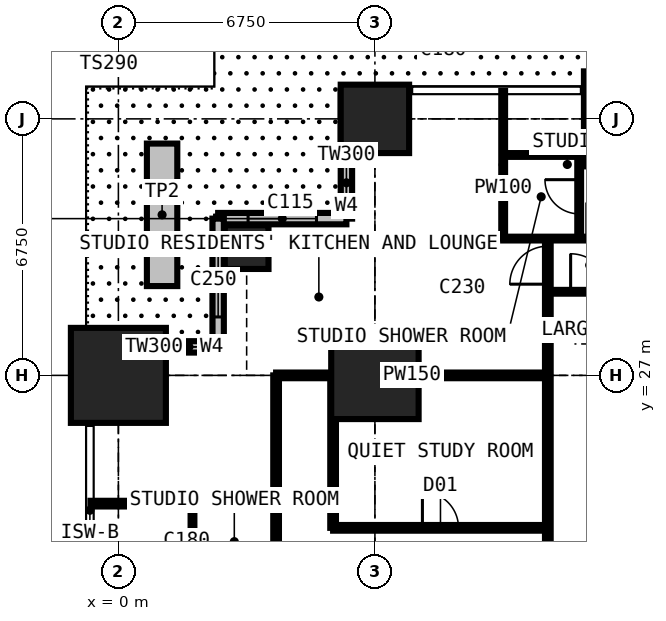
"""IFC4 building model, lengths in metres.
Left out: names, types, materials, properties, quantities, classifications, styles, units other than length and angle.
Written with IfcOpenShell. Run it as: python <this file> out.ifc"""

import sys

from ifc_helpers import new_model, si_unit, direction, frame, frame_2d, origin, origin_2d, place, context, subcontext, project, spatial, rectangle, extrude, element, fill, save


model = new_model("IFC4")
c1 = context("Model", 3, precision=1e-05, world=origin(), true_north=direction((0.0, 1.0)))
c2 = subcontext(c1, "Body", "Model", "MODEL_VIEW")
j1 = project(units=[si_unit("LENGTHUNIT", "METRE"), si_unit("PLANEANGLEUNIT", "RADIAN")], contexts=[c1])
p1 = place(None, origin())
s1 = spatial("IfcSite", under=j1, at=p1, CompositionType="ELEMENT")
p2 = place(p1, origin())
s2 = spatial("IfcBuilding", under=s1, at=p2, CompositionType="ELEMENT")
p3 = place(p2, frame((0.0, 0.0, 80.1)))
s3 = spatial("IfcBuildingStorey", under=s2, at=p3, CompositionType="ELEMENT", Elevation=80.1)
p4 = place(p3, frame((0.0, 27.0, 0.0), z_axis=(0.0, 0.0, 1.0), x_axis=(1.0, 0.0, 0.0)))
e1 = element("IfcColumn", 1, at=p4, inside=s3, PredefinedType="COLUMN", context=c2, shape_type="SweptSolid", body=[
    extrude(rectangle(XDim=2.5, YDim=2.5, at=origin_2d()), origin(), (0.0, 0.0, 1.0), 3.6),
])
p5 = place(p3, frame((3.375, 30.375, 0.0), z_axis=(0.0, 0.0, 1.0), x_axis=(1.0, 0.0, 0.0)))
e2 = element("IfcColumn", 2, at=p5, inside=s3, PredefinedType="COLUMN", context=c2, shape_type="SweptSolid", body=[
    extrude(rectangle(XDim=1.15, YDim=1.15, at=origin_2d()), origin(), (0.0, 0.0, 1.0), 3.6),
])
p6 = place(p3, frame((6.75, 27.0, 0.0), z_axis=(0.0, 0.0, 1.0), x_axis=(1.0, 0.0, 0.0)))
e3 = element("IfcColumn", 3, at=p6, inside=s3, PredefinedType="COLUMN", context=c2, shape_type="SweptSolid", body=[
    extrude(rectangle(XDim=2.3, YDim=2.3, at=origin_2d()), origin(), (0.0, 0.0, 1.0), 3.6),
])
p7 = place(p3, frame((6.75, 33.75, 0.0), z_axis=(0.0, 0.0, 1.0), x_axis=(1.0, 0.0, 0.0)))
e4 = element("IfcColumn", 4, at=p7, inside=s3, PredefinedType="COLUMN", context=c2, shape_type="SweptSolid", body=[
    extrude(rectangle(XDim=1.8, YDim=1.8, at=origin_2d()), origin(), (0.0, 0.0, 1.0), 3.6),
])
p8 = place(p3, frame((13.5, 33.75, 0.0), z_axis=(0.0, 0.0, 1.0), x_axis=(1.0, 0.0, 0.0)))
e5 = element("IfcColumn", 5, at=p8, inside=s3, PredefinedType="COLUMN", context=c2, shape_type="SweptSolid", body=[
    extrude(rectangle(XDim=2.5, YDim=2.5, at=origin_2d()), origin(), (0.0, 0.0, 1.0), 3.6),
])
p9 = place(p3, frame((6.0, 34.5, 0.0), z_axis=(0.0, 0.0, 1.0), x_axis=(0.0, -1.0, 0.0)))
e6 = element("IfcWall", 6, at=p9, inside=s3, PredefinedType="SOLIDWALL", context=c2, shape_type="SweptSolid", body=[
    extrude(rectangle(XDim=3.375, YDim=0.3, at=frame_2d((1.688, 0.0))), origin(), (0.0, 0.0, 1.0), 3.375),
])
p10 = place(p9, frame((1.833, 0.0, 0.9)))
e7 = element("IfcOpeningElement", 7, at=p10, cuts=e6, PredefinedType="OPENING", context=c2, shape_type="SweptSolid", body=[
    extrude(rectangle(XDim=1.2, YDim=1.8, at=frame_2d((0.6, 0.9))), frame((0.0, 0.16, 0.0), z_axis=(0.0, -1.0, 0.0), x_axis=(1.0, 0.0, 0.0)), (0.0, 0.0, 1.0), 0.32),
])
p11 = place(p3, frame((6.0, 31.125, 0.0), z_axis=(0.0, 0.0, 1.0), x_axis=(-1.0, 0.0, 0.0)))
e8 = element("IfcWall", 8, at=p11, inside=s3, PredefinedType="SOLIDWALL", context=c2, shape_type="SweptSolid", body=[
    extrude(rectangle(XDim=3.375, YDim=0.3, at=frame_2d((1.688, 0.0))), origin(), (0.0, 0.0, 1.0), 3.375),
])
p12 = place(p11, frame((0.788, 0.0, 0.6)))
e9 = element("IfcOpeningElement", 9, at=p12, cuts=e8, PredefinedType="OPENING", context=c2, shape_type="SweptSolid", body=[
    extrude(rectangle(XDim=1.8, YDim=2.1, at=frame_2d((0.9, 1.05))), frame((0.0, 0.16, 0.0), z_axis=(0.0, -1.0, 0.0), x_axis=(1.0, 0.0, 0.0)), (0.0, 0.0, 1.0), 0.32),
])
p13 = place(p3, frame((2.625, 31.125, 0.0), z_axis=(0.0, 0.0, 1.0), x_axis=(0.0, -1.0, 0.0)))
e10 = element("IfcWall", 10, at=p13, inside=s3, PredefinedType="SOLIDWALL", context=c2, shape_type="SweptSolid", body=[
    extrude(rectangle(XDim=3.375, YDim=0.3, at=frame_2d((1.688, 0.0))), origin(), (0.0, 0.0, 1.0), 3.375),
])
p14 = place(p13, frame((0.788, 0.0, 0.6)))
e11 = element("IfcOpeningElement", 11, at=p14, cuts=e10, PredefinedType="OPENING", context=c2, shape_type="SweptSolid", body=[
    extrude(rectangle(XDim=1.8, YDim=2.1, at=frame_2d((0.9, 1.05))), frame((0.0, 0.16, 0.0), z_axis=(0.0, -1.0, 0.0), x_axis=(1.0, 0.0, 0.0)), (0.0, 0.0, 1.0), 0.32),
])
p15 = place(p3, frame((2.625, 27.75, 0.0), z_axis=(0.0, 0.0, 1.0), x_axis=(-1.0, 0.0, 0.0)))
e12 = element("IfcWall", 12, at=p15, inside=s3, PredefinedType="SOLIDWALL", context=c2, shape_type="SweptSolid", body=[
    extrude(rectangle(XDim=3.375, YDim=0.3, at=frame_2d((1.688, 0.0))), origin(), (0.0, 0.0, 1.0), 3.375),
])
p16 = place(p15, frame((0.167, 0.0, 0.9)))
e13 = element("IfcOpeningElement", 13, at=p16, cuts=e12, PredefinedType="OPENING", context=c2, shape_type="SweptSolid", body=[
    extrude(rectangle(XDim=1.2, YDim=1.8, at=frame_2d((0.6, 0.9))), frame((0.0, 0.16, 0.0), z_axis=(0.0, -1.0, 0.0), x_axis=(1.0, 0.0, 0.0)), (0.0, 0.0, 1.0), 0.32),
])
p17 = place(p3, frame((1.15, 29.35, -0.06), z_axis=(0.0, 0.0, 1.0), x_axis=(0.0, 1.0, 0.0)))
e14 = element("IfcWall", 14, at=p17, inside=s3, PredefinedType="USERDEFINED", context=c2, shape_type="SweptSolid", body=[
    extrude(rectangle(XDim=3.75, YDim=0.8, at=frame_2d((1.875, 0.0))), origin(), (0.0, 0.0, 1.0), 0.66),
])
p18 = place(p3, frame((-0.734, 23.625, 0.0), z_axis=(0.0, 0.0, 1.0), x_axis=(1.0, 0.0, 0.0)))
e15 = element("IfcWall", 15, at=p18, inside=s3, PredefinedType="PARTITIONING", context=c2, shape_type="SweptSolid", body=[
    extrude(rectangle(XDim=4.884, YDim=0.15, at=frame_2d((2.442, 0.0))), origin(), (0.0, 0.0, 1.0), 3.375),
])
p19 = place(p3, frame((1.95, 21.625, 0.0), z_axis=(0.0, 0.0, 1.0), x_axis=(0.0, 1.0, 0.0)))
e16 = element("IfcWall", 16, at=p19, inside=s3, PredefinedType="PARTITIONING", context=c2, shape_type="SweptSolid", body=[
    extrude(rectangle(XDim=2.0, YDim=0.1, at=frame_2d((1.0, 0.0))), origin(), (0.0, 0.0, 1.0), 3.375),
])
p20 = place(p3, frame((4.15, 10.125, 0.0), z_axis=(0.0, 0.0, 1.0), x_axis=(0.0, 1.0, 0.0)))
e17 = element("IfcWall", 17, at=p20, inside=s3, PredefinedType="PARTITIONING", context=c2, shape_type="SweptSolid", body=[
    extrude(rectangle(XDim=16.875, YDim=0.15, at=frame_2d((8.438, 0.0))), origin(), (0.0, 0.0, 1.0), 3.375),
])
p21 = place(p20, frame((7.575, 0.0, 0.0)))
e18 = element("IfcOpeningElement", 18, at=p21, cuts=e17, PredefinedType="OPENING", context=c2, shape_type="SweptSolid", body=[
    extrude(rectangle(XDim=0.95, YDim=2.2, at=frame_2d((0.475, 1.1))), frame((0.0, 0.085, 0.0), z_axis=(0.0, -1.0, 0.0), x_axis=(1.0, 0.0, 0.0)), (0.0, 0.0, 1.0), 0.17),
])
p22 = place(p20, frame((0.2, 0.0, 0.0)))
e19 = element("IfcOpeningElement", 19, at=p22, cuts=e17, PredefinedType="OPENING", context=c2, shape_type="SweptSolid", body=[
    extrude(rectangle(XDim=0.95, YDim=2.2, at=frame_2d((0.475, 1.1))), frame((0.0, 0.085, 0.0), z_axis=(0.0, -1.0, 0.0), x_axis=(1.0, 0.0, 0.0)), (0.0, 0.0, 1.0), 0.17),
])
p23 = place(p20, frame((10.375, 0.0, 0.0)))
e20 = element("IfcOpeningElement", 20, at=p23, cuts=e17, PredefinedType="OPENING", context=c2, shape_type="SweptSolid", body=[
    extrude(rectangle(XDim=0.95, YDim=2.2, at=frame_2d((0.475, 1.1))), frame((0.0, 0.085, 0.0), z_axis=(0.0, -1.0, 0.0), x_axis=(1.0, 0.0, 0.0)), (0.0, 0.0, 1.0), 0.17),
])
p24 = place(p3, frame((4.15, 27.0, 0.0), z_axis=(0.0, 0.0, 1.0), x_axis=(1.0, 0.0, 0.0)))
e21 = element("IfcWall", 21, at=p24, inside=s3, PredefinedType="PARTITIONING", context=c2, shape_type="SweptSolid", body=[
    extrude(rectangle(XDim=7.15, YDim=0.15, at=frame_2d((3.575, 0.0))), origin(), (0.0, 0.0, 1.0), 2.806),
])
p25 = place(p3, frame((5.65, 22.988, 0.0), z_axis=(0.0, 0.0, 1.0), x_axis=(0.0, 1.0, 0.0)))
e22 = element("IfcWall", 22, at=p25, inside=s3, PredefinedType="PARTITIONING", context=c2, shape_type="SweptSolid", body=[
    extrude(rectangle(XDim=4.012, YDim=0.15, at=frame_2d((2.006, 0.0))), origin(), (0.0, 0.0, 1.0), 3.375),
])
p26 = place(p3, frame((5.65, 22.988, 0.0), z_axis=(0.0, 0.0, 1.0), x_axis=(1.0, 0.0, 0.0)))
e23 = element("IfcWall", 23, at=p26, inside=s3, PredefinedType="PARTITIONING", context=c2, shape_type="SweptSolid", body=[
    extrude(rectangle(XDim=5.65, YDim=0.15, at=frame_2d((2.825, 0.0))), origin(), (0.0, 0.0, 1.0), 3.375),
])
p27 = place(p26, frame((2.35, 0.0, 0.0)))
e24 = element("IfcOpeningElement", 24, at=p27, cuts=e23, PredefinedType="OPENING", context=c2, shape_type="SweptSolid", body=[
    extrude(rectangle(XDim=0.95, YDim=2.2, at=frame_2d((0.475, 1.1))), frame((0.0, 0.085, 0.0), z_axis=(0.0, -1.0, 0.0), x_axis=(1.0, 0.0, 0.0)), (0.0, 0.0, 1.0), 0.17),
])
p28 = place(p3, frame((10.125, 30.6, 0.0), z_axis=(0.0, 0.0, 1.0), x_axis=(0.0, 1.0, 0.0)))
e25 = element("IfcWall", 25, at=p28, inside=s3, PredefinedType="PARTITIONING", context=c2, shape_type="SweptSolid", body=[
    extrude(rectangle(XDim=3.884, YDim=0.1, at=frame_2d((1.942, 0.0))), origin(), (0.0, 0.0, 1.0), 3.375),
])
p29 = place(p3, frame((10.125, 30.6, 0.0), z_axis=(0.0, 0.0, 1.0), x_axis=(1.0, 0.0, 0.0)))
e26 = element("IfcWall", 26, at=p29, inside=s3, PredefinedType="PARTITIONING", context=c2, shape_type="SweptSolid", body=[
    extrude(rectangle(XDim=3.375, YDim=0.1, at=frame_2d((1.688, 0.0))), origin(), (0.0, 0.0, 1.0), 3.375),
])
p30 = place(p29, frame((2.2, 0.0, 0.0)))
e27 = element("IfcOpeningElement", 27, at=p30, cuts=e26, PredefinedType="OPENING", context=c2, shape_type="SweptSolid", body=[
    extrude(rectangle(XDim=0.95, YDim=2.2, at=frame_2d((0.475, 1.1))), frame((0.0, 0.06, 0.0), z_axis=(0.0, -1.0, 0.0), x_axis=(1.0, 0.0, 0.0)), (0.0, 0.0, 1.0), 0.12),
])
p31 = place(p3, frame((10.125, 32.8, 0.0), z_axis=(0.0, 0.0, 1.0), x_axis=(1.0, 0.0, 0.0)))
e28 = element("IfcWall", 28, at=p31, inside=s3, PredefinedType="PARTITIONING", context=c2, shape_type="SweptSolid", body=[
    extrude(rectangle(XDim=2.0, YDim=0.1, at=frame_2d((1.0, 0.0))), origin(), (0.0, 0.0, 1.0), 3.375),
])
p32 = place(p3, frame((11.3, 11.3, 0.0), z_axis=(0.0, 0.0, 1.0), x_axis=(0.0, 1.0, 0.0)))
e29 = element("IfcWall", 29, at=p32, inside=s3, PredefinedType="PARTITIONING", context=c2, shape_type="SweptSolid", body=[
    extrude(rectangle(XDim=19.3, YDim=0.15, at=frame_2d((9.65, 0.0))), origin(), (0.0, 0.0, 1.0), 3.375),
])
p33 = place(p32, frame((18.1, 0.0, 0.0)))
e30 = element("IfcOpeningElement", 30, at=p33, cuts=e29, PredefinedType="OPENING", context=c2, shape_type="SweptSolid", body=[
    extrude(rectangle(XDim=1.0, YDim=2.2, at=frame_2d((0.5, 1.1))), frame((0.0, 0.085, 0.0), z_axis=(0.0, -1.0, 0.0), x_axis=(1.0, 0.0, 0.0)), (0.0, 0.0, 1.0), 0.17),
])
p34 = place(p32, frame((10.137, 0.0, 0.0)))
e31 = element("IfcOpeningElement", 31, at=p34, cuts=e29, PredefinedType="OPENING", context=c2, shape_type="SweptSolid", body=[
    extrude(rectangle(XDim=1.0, YDim=2.2, at=frame_2d((0.5, 1.1))), frame((0.0, 0.085, 0.0), z_axis=(0.0, -1.0, 0.0), x_axis=(1.0, 0.0, 0.0)), (0.0, 0.0, 1.0), 0.17),
])
p35 = place(p3, frame((11.3, 29.2, 0.0), z_axis=(0.0, 0.0, 1.0), x_axis=(1.0, 0.0, 0.0)))
e32 = element("IfcWall", 32, at=p35, inside=s3, PredefinedType="PARTITIONING", context=c2, shape_type="SweptSolid", body=[
    extrude(rectangle(XDim=19.075, YDim=0.1, at=frame_2d((9.538, 0.0))), origin(), (0.0, 0.0, 1.0), 3.375),
])
p36 = place(p35, frame((6.4, 0.0, 0.0)))
e33 = element("IfcOpeningElement", 33, at=p36, cuts=e32, PredefinedType="OPENING", context=c2, shape_type="SweptSolid", body=[
    extrude(rectangle(XDim=0.95, YDim=2.2, at=frame_2d((0.475, 1.1))), frame((0.0, 0.06, 0.0), z_axis=(0.0, -1.0, 0.0), x_axis=(1.0, 0.0, 0.0)), (0.0, 0.0, 1.0), 0.12),
])
p37 = place(p35, frame((13.15, 0.0, 0.0)))
e34 = element("IfcOpeningElement", 34, at=p37, cuts=e32, PredefinedType="OPENING", context=c2, shape_type="SweptSolid", body=[
    extrude(rectangle(XDim=0.95, YDim=2.2, at=frame_2d((0.475, 1.1))), frame((0.0, 0.06, 0.0), z_axis=(0.0, -1.0, 0.0), x_axis=(1.0, 0.0, 0.0)), (0.0, 0.0, 1.0), 0.12),
])
p38 = place(p35, frame((15.95, 0.0, 0.0)))
e35 = element("IfcOpeningElement", 35, at=p38, cuts=e32, PredefinedType="OPENING", context=c2, shape_type="SweptSolid", body=[
    extrude(rectangle(XDim=0.95, YDim=2.2, at=frame_2d((0.475, 1.1))), frame((0.0, 0.06, 0.0), z_axis=(0.0, -1.0, 0.0), x_axis=(1.0, 0.0, 0.0)), (0.0, 0.0, 1.0), 0.12),
])
p39 = place(p35, frame((0.6, 0.0, 0.0)))
e36 = element("IfcOpeningElement", 36, at=p39, cuts=e32, PredefinedType="OPENING", context=c2, shape_type="SweptSolid", body=[
    extrude(rectangle(XDim=1.0, YDim=2.2, at=frame_2d((0.5, 1.1))), frame((0.0, 0.06, 0.0), z_axis=(0.0, -1.0, 0.0), x_axis=(1.0, 0.0, 0.0)), (0.0, 0.0, 1.0), 0.12),
])
p40 = place(p3, frame((12.125, 30.6, 0.0), z_axis=(0.0, 0.0, 1.0), x_axis=(0.0, 1.0, 0.0)))
e37 = element("IfcWall", 37, at=p40, inside=s3, PredefinedType="PARTITIONING", context=c2, shape_type="SweptSolid", body=[
    extrude(rectangle(XDim=2.2, YDim=0.1, at=frame_2d((1.1, 0.0))), origin(), (0.0, 0.0, 1.0), 3.375),
])
p41 = place(p40, frame((0.65, 0.0, 0.0)))
e38 = element("IfcOpeningElement", 38, at=p41, cuts=e37, PredefinedType="OPENING", context=c2, shape_type="SweptSolid", body=[
    extrude(rectangle(XDim=0.9, YDim=2.2, at=frame_2d((0.45, 1.1))), frame((0.0, 0.06, 0.0), z_axis=(0.0, -1.0, 0.0), x_axis=(1.0, 0.0, 0.0)), (0.0, 0.0, 1.0), 0.12),
])
p42 = place(p10, origin())
e39 = element("IfcWindow", 39, at=p42, inside=s3, PartitioningType="SINGLE_PANEL", PredefinedType="WINDOW", context=c2, shape_type="SweptSolid", body=[
    extrude(rectangle(XDim=1.2, YDim=1.8, at=frame_2d((0.6, 0.9))), frame((0.0, 0.03, 0.0), z_axis=(0.0, -1.0, 0.0), x_axis=(1.0, 0.0, 0.0)), (0.0, 0.0, 1.0), 0.06),
])
fill(e7, e39)
p43 = place(p12, origin())
e40 = element("IfcWindow", 40, at=p43, inside=s3, PartitioningType="SINGLE_PANEL", PredefinedType="WINDOW", context=c2, shape_type="SweptSolid", body=[
    extrude(rectangle(XDim=1.8, YDim=2.1, at=frame_2d((0.9, 1.05))), frame((0.0, 0.03, 0.0), z_axis=(0.0, -1.0, 0.0), x_axis=(1.0, 0.0, 0.0)), (0.0, 0.0, 1.0), 0.06),
])
fill(e9, e40)
p44 = place(p14, origin())
e41 = element("IfcWindow", 41, at=p44, inside=s3, PartitioningType="SINGLE_PANEL", PredefinedType="WINDOW", context=c2, shape_type="SweptSolid", body=[
    extrude(rectangle(XDim=1.8, YDim=2.1, at=frame_2d((0.9, 1.05))), frame((0.0, 0.03, 0.0), z_axis=(0.0, -1.0, 0.0), x_axis=(1.0, 0.0, 0.0)), (0.0, 0.0, 1.0), 0.06),
])
fill(e11, e41)
p45 = place(p16, origin())
e42 = element("IfcWindow", 42, at=p45, inside=s3, PartitioningType="SINGLE_PANEL", PredefinedType="WINDOW", context=c2, shape_type="SweptSolid", body=[
    extrude(rectangle(XDim=1.2, YDim=1.8, at=frame_2d((0.6, 0.9))), frame((0.0, 0.03, 0.0), z_axis=(0.0, -1.0, 0.0), x_axis=(1.0, 0.0, 0.0)), (0.0, 0.0, 1.0), 0.06),
])
fill(e13, e42)
p46 = place(p41, origin())
e43 = element("IfcDoor", 43, at=p46, inside=s3, OperationType="SINGLE_SWING_RIGHT", PredefinedType="DOOR", context=c2, shape_type="SweptSolid", body=[
    extrude(rectangle(XDim=0.9, YDim=2.2, at=frame_2d((0.45, 1.1))), frame((0.0, 0.025, 0.0), z_axis=(0.0, -1.0, 0.0), x_axis=(1.0, 0.0, 0.0)), (0.0, 0.0, 1.0), 0.05),
])
fill(e38, e43)
p47 = place(p39, origin())
e44 = element("IfcDoor", 44, at=p47, inside=s3, OperationType="SINGLE_SWING_LEFT", PredefinedType="DOOR", context=c2, shape_type="SweptSolid", body=[
    extrude(rectangle(XDim=1.0, YDim=2.2, at=frame_2d((0.5, 1.1))), frame((0.0, 0.025, 0.0), z_axis=(0.0, -1.0, 0.0), x_axis=(1.0, 0.0, 0.0)), (0.0, 0.0, 1.0), 0.05),
])
fill(e36, e44)
p48 = place(p33, origin())
e45 = element("IfcDoor", 45, at=p48, inside=s3, OperationType="SINGLE_SWING_LEFT", PredefinedType="DOOR", context=c2, shape_type="SweptSolid", body=[
    extrude(rectangle(XDim=1.0, YDim=2.2, at=frame_2d((0.5, 1.1))), frame((0.0, 0.025, 0.0), z_axis=(0.0, -1.0, 0.0), x_axis=(1.0, 0.0, 0.0)), (0.0, 0.0, 1.0), 0.05),
])
fill(e30, e45)
p49 = place(p27, origin())
e46 = element("IfcDoor", 46, at=p49, inside=s3, OperationType="SINGLE_SWING_LEFT", PredefinedType="DOOR", context=c2, shape_type="SweptSolid", body=[
    extrude(rectangle(XDim=0.95, YDim=2.2, at=frame_2d((0.475, 1.1))), frame((0.0, 0.025, 0.0), z_axis=(0.0, -1.0, 0.0), x_axis=(1.0, 0.0, 0.0)), (0.0, 0.0, 1.0), 0.05),
])
fill(e24, e46)
save(model, sys.argv[1])
